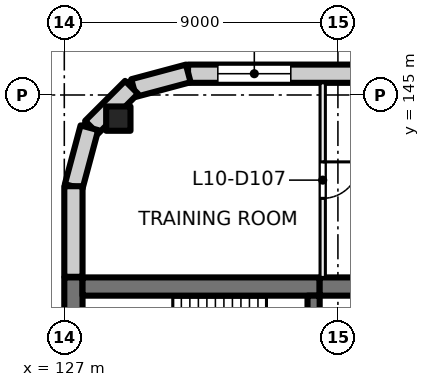
"""IFC4 building model, lengths in metres.
Left out: names, types, materials, properties, quantities, classifications, styles, units other than length and angle.
Written with IfcOpenShell. Run it as: python <this file> out.ifc"""

import sys

from ifc_helpers import new_model, si_unit, direction, frame, frame_2d, origin, origin_2d, place, context, subcontext, project, spatial, rectangle, extrude, element, fill, save


model = new_model("IFC4")
c1 = context("Model", 3, precision=1e-05, world=origin(), true_north=direction((0.0, 1.0)))
c2 = subcontext(c1, "Body", "Model", "MODEL_VIEW")
j1 = project(units=[si_unit("LENGTHUNIT", "METRE"), si_unit("PLANEANGLEUNIT", "RADIAN")], contexts=[c1])
p1 = place(None, origin())
s1 = spatial("IfcSite", under=j1, at=p1, CompositionType="ELEMENT")
p2 = place(p1, origin())
s2 = spatial("IfcBuilding", under=s1, at=p2, CompositionType="ELEMENT")
p3 = place(p2, frame((0.0, 0.0, 47.5)))
s3 = spatial("IfcBuildingStorey", under=s2, at=p3, CompositionType="ELEMENT", Elevation=47.5)
p4 = place(p3, frame((128.777, 144.223, 0.0), z_axis=(0.0, 0.0, 1.0), x_axis=(1.0, 0.0, 0.0)))
e1 = element("IfcColumn", 1, at=p4, inside=s3, PredefinedType="COLUMN", context=c2, shape_type="SweptSolid", body=[
    extrude(rectangle(XDim=0.8, YDim=0.8, at=origin_2d()), origin(), (0.0, 0.0, 1.0), 4.0),
])
p5 = place(p3, frame((127.3, 135.2, 0.0), z_axis=(0.0, 0.0, 1.0), x_axis=(0.0, 1.0, 0.0)))
e2 = element("IfcWall", 2, at=p5, inside=s3, PredefinedType="SHEAR", context=c2, shape_type="SweptSolid", body=[
    extrude(rectangle(XDim=3.8, YDim=0.6, at=frame_2d((1.9, 0.0))), origin(), (0.0, 0.0, 1.0), 4.0),
])
p6 = place(p3, frame((127.6, 138.7, 0.0), z_axis=(0.0, 0.0, 1.0), x_axis=(1.0, 0.0, 0.0)))
e3 = element("IfcWall", 3, at=p6, inside=s3, PredefinedType="SHEAR", context=c2, shape_type="SweptSolid", body=[
    extrude(rectangle(XDim=7.8, YDim=0.6, at=frame_2d((3.9, 0.0))), origin(), (0.0, 0.0, 1.0), 4.0),
])
p7 = place(p3, frame((135.4, 138.7, 0.0), z_axis=(0.0, 0.0, 1.0), x_axis=(1.0, 0.0, 0.0)))
e4 = element("IfcWall", 4, at=p7, inside=s3, PredefinedType="SHEAR", context=c2, shape_type="SweptSolid", body=[
    extrude(rectangle(XDim=4.6, YDim=0.6, at=frame_2d((2.3, 0.0))), origin(), (0.0, 0.0, 1.0), 4.0),
])
p8 = place(p3, frame((135.2, 135.6, 0.0), z_axis=(0.0, 0.0, 1.0), x_axis=(0.0, 1.0, 0.0)))
e5 = element("IfcWall", 5, at=p8, inside=s3, PredefinedType="SHEAR", context=c2, shape_type="SweptSolid", body=[
    extrude(rectangle(XDim=2.8, YDim=0.4, at=frame_2d((1.4, 0.0))), origin(), (0.0, 0.0, 1.0), 4.0),
])
p9 = place(p8, frame((0.9, 0.0, 0.0)))
e6 = element("IfcOpeningElement", 6, at=p9, cuts=e5, PredefinedType="OPENING", context=c2, shape_type="SweptSolid", body=[
    extrude(rectangle(XDim=1.0, YDim=2.1, at=frame_2d((0.5, 1.05))), frame((0.0, 0.21, 0.0), z_axis=(0.0, -1.0, 0.0), x_axis=(1.0, 0.0, 0.0)), (0.0, 0.0, 1.0), 0.42),
])
p10 = place(p3, frame((131.07, 145.7, 0.0), z_axis=(0.0, 0.0, 1.0), x_axis=(1.0, 0.0, 0.0)))
e7 = element("IfcWall", 7, at=p10, inside=s3, PredefinedType="SOLIDWALL", context=c2, shape_type="SweptSolid", body=[
    extrude(rectangle(XDim=31.93, YDim=0.6, at=frame_2d((15.965, 0.0))), origin(), (0.0, 0.0, 1.0), 3.625),
])
p11 = place(p10, frame((0.98, 0.0, 0.9)))
e8 = element("IfcOpeningElement", 8, at=p11, cuts=e7, PredefinedType="OPENING", context=c2, shape_type="SweptSolid", body=[
    extrude(rectangle(XDim=2.4, YDim=2.4, at=frame_2d((1.2, 1.2))), frame((0.0, 0.31, 0.0), z_axis=(0.0, -1.0, 0.0), x_axis=(1.0, 0.0, 0.0)), (0.0, 0.0, 1.0), 0.62),
])
p12 = place(p10, frame((5.48, 0.0, 0.9)))
e9 = element("IfcOpeningElement", 9, at=p12, cuts=e7, PredefinedType="OPENING", context=c2, shape_type="SweptSolid", body=[
    extrude(rectangle(XDim=2.4, YDim=2.4, at=frame_2d((1.2, 1.2))), frame((0.0, 0.31, 0.0), z_axis=(0.0, -1.0, 0.0), x_axis=(1.0, 0.0, 0.0)), (0.0, 0.0, 1.0), 0.62),
])
p13 = place(p10, frame((9.98, 0.0, 0.9)))
e10 = element("IfcOpeningElement", 10, at=p13, cuts=e7, PredefinedType="OPENING", context=c2, shape_type="SweptSolid", body=[
    extrude(rectangle(XDim=2.4, YDim=2.4, at=frame_2d((1.2, 1.2))), frame((0.0, 0.31, 0.0), z_axis=(0.0, -1.0, 0.0), x_axis=(1.0, 0.0, 0.0)), (0.0, 0.0, 1.0), 0.62),
])
p14 = place(p10, frame((14.48, 0.0, 0.9)))
e11 = element("IfcOpeningElement", 11, at=p14, cuts=e7, PredefinedType="OPENING", context=c2, shape_type="SweptSolid", body=[
    extrude(rectangle(XDim=2.4, YDim=2.4, at=frame_2d((1.2, 1.2))), frame((0.0, 0.31, 0.0), z_axis=(0.0, -1.0, 0.0), x_axis=(1.0, 0.0, 0.0)), (0.0, 0.0, 1.0), 0.62),
])
p15 = place(p10, frame((18.98, 0.0, 0.9)))
e12 = element("IfcOpeningElement", 12, at=p15, cuts=e7, PredefinedType="OPENING", context=c2, shape_type="SweptSolid", body=[
    extrude(rectangle(XDim=2.4, YDim=2.4, at=frame_2d((1.2, 1.2))), frame((0.0, 0.31, 0.0), z_axis=(0.0, -1.0, 0.0), x_axis=(1.0, 0.0, 0.0)), (0.0, 0.0, 1.0), 0.62),
])
p16 = place(p10, frame((23.48, 0.0, 0.9)))
e13 = element("IfcOpeningElement", 13, at=p16, cuts=e7, PredefinedType="OPENING", context=c2, shape_type="SweptSolid", body=[
    extrude(rectangle(XDim=2.4, YDim=2.4, at=frame_2d((1.2, 1.2))), frame((0.0, 0.31, 0.0), z_axis=(0.0, -1.0, 0.0), x_axis=(1.0, 0.0, 0.0)), (0.0, 0.0, 1.0), 0.62),
])
p17 = place(p10, frame((27.98, 0.0, 0.9)))
e14 = element("IfcOpeningElement", 14, at=p17, cuts=e7, PredefinedType="OPENING", context=c2, shape_type="SweptSolid", body=[
    extrude(rectangle(XDim=2.4, YDim=2.4, at=frame_2d((1.2, 1.2))), frame((0.0, 0.31, 0.0), z_axis=(0.0, -1.0, 0.0), x_axis=(1.0, 0.0, 0.0)), (0.0, 0.0, 1.0), 0.62),
])
for number, where, z_axis, x_axis in (
    (15, (129.281, 145.229, 0.0), (0.0, 0.0, 1.0), (0.966, 0.259, 0.0)),
    (16, (127.896, 143.936, 0.0), (0.0, 0.0, 1.0), (0.707, 0.707, 0.0)),
):
    element("IfcWall", number, at=place(p3, frame(where, z_axis=z_axis, x_axis=x_axis)), inside=s3, PredefinedType="SOLIDWALL", context=c2, shape_type="SweptSolid", body=[
        extrude(rectangle(XDim=1.861, YDim=0.6, at=frame_2d((0.93, 0.0))), origin(), (0.0, 0.0, 1.0), 3.625),
    ])
p18 = place(p3, frame((127.308, 141.99, 0.0), z_axis=(0.0, 0.0, 1.0), x_axis=(0.258839784042, 0.965920269068, 0.0)))
e17 = element("IfcWall", 17, at=p18, inside=s3, PredefinedType="SOLIDWALL", context=c2, shape_type="SweptSolid", body=[
    extrude(rectangle(XDim=2.0, YDim=0.6, at=frame_2d((1.0, 0.0))), origin(), (0.0, 0.0, 1.0), 3.625),
])
p19 = place(p3, frame((127.3, 139.02, 0.0), z_axis=(0.0, 0.0, 1.0), x_axis=(0.0, 1.0, 0.0)))
e18 = element("IfcWall", 18, at=p19, inside=s3, PredefinedType="SOLIDWALL", context=c2, shape_type="SweptSolid", body=[
    extrude(rectangle(XDim=2.98, YDim=0.6, at=frame_2d((1.49, 0.0))), origin(), (0.0, 0.0, 1.0), 3.625),
])
p20 = place(p3, frame((135.5, 145.4, 0.0), z_axis=(0.0, 0.0, 1.0), x_axis=(0.0, -1.0, 0.0)))
e19 = element("IfcWall", 19, at=p20, inside=s3, PredefinedType="PARTITIONING", context=c2, shape_type="SweptSolid", body=[
    extrude(rectangle(XDim=6.4, YDim=0.175, at=frame_2d((3.2, 0.0))), origin(), (0.0, 0.0, 1.0), 3.625),
])
p21 = place(p20, frame((2.6, 0.0, 0.0)))
e20 = element("IfcOpeningElement", 20, at=p21, cuts=e19, PredefinedType="OPENING", context=c2, shape_type="SweptSolid", body=[
    extrude(rectangle(XDim=1.2, YDim=2.1, at=frame_2d((0.6, 1.05))), frame((0.0, 0.097, 0.0), z_axis=(0.0, -1.0, 0.0), x_axis=(1.0, 0.0, 0.0)), (0.0, 0.0, 1.0), 0.195),
])
p22 = place(p11, origin())
e21 = element("IfcWindow", 21, at=p22, inside=s3, PartitioningType="SINGLE_PANEL", PredefinedType="WINDOW", context=c2, shape_type="SweptSolid", body=[
    extrude(rectangle(XDim=2.4, YDim=2.4, at=frame_2d((1.2, 1.2))), frame((0.0, 0.03, 0.0), z_axis=(0.0, -1.0, 0.0), x_axis=(1.0, 0.0, 0.0)), (0.0, 0.0, 1.0), 0.06),
])
fill(e8, e21)
p23 = place(p21, origin())
e22 = element("IfcDoor", 22, at=p23, inside=s3, OperationType="DOUBLE_DOOR_SINGLE_SWING", PredefinedType="DOOR", context=c2, shape_type="SweptSolid", body=[
    extrude(rectangle(XDim=1.2, YDim=2.1, at=frame_2d((0.6, 1.05))), frame((0.0, 0.025, 0.0), z_axis=(0.0, -1.0, 0.0), x_axis=(1.0, 0.0, 0.0)), (0.0, 0.0, 1.0), 0.05),
])
fill(e20, e22)
save(model, sys.argv[1])
